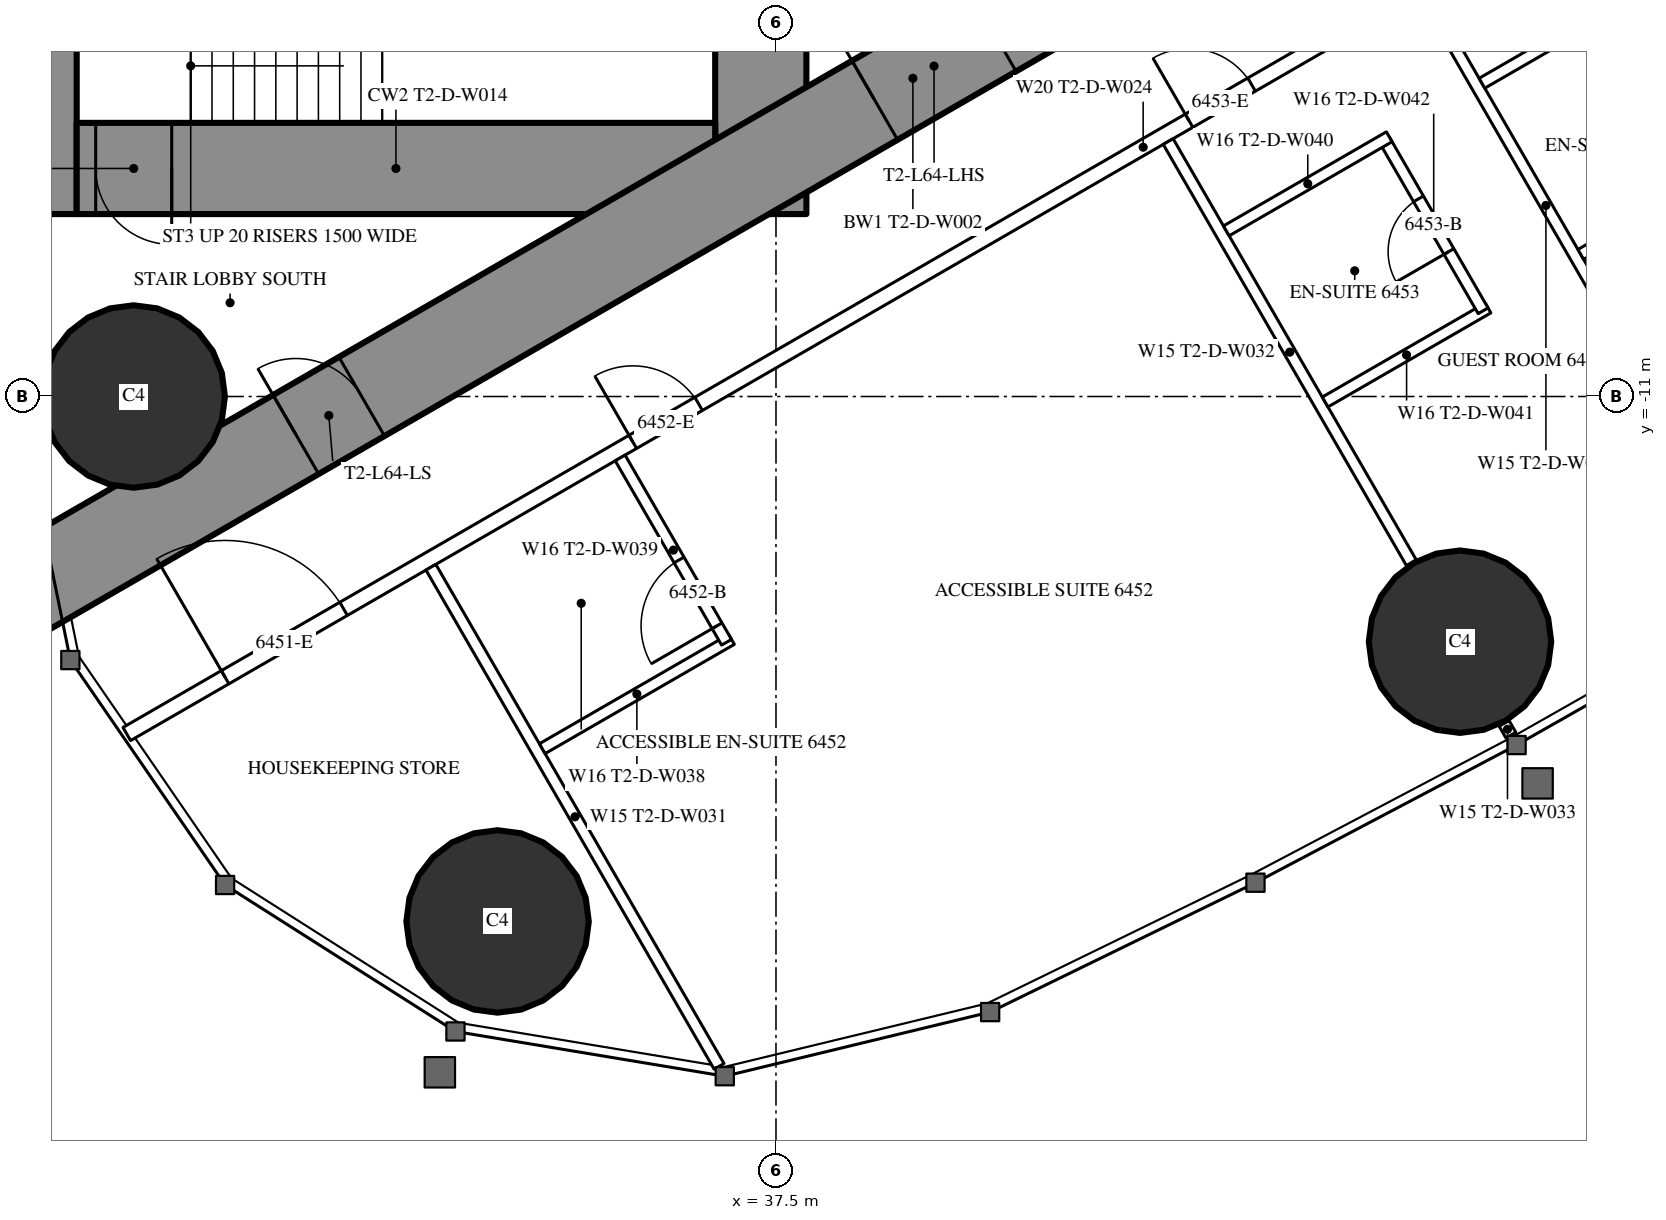
"""IFC4 building model, lengths in metres.
Left out: names, types, materials, properties, quantities, classifications, styles, units other than length and angle.
Written with IfcOpenShell. Run it as: python <this file> out.ifc"""

import sys

from ifc_helpers import new_model, si_unit, direction, frame, frame_2d, origin, origin_2d, place, context, subcontext, project, spatial, rectangle, circle, extrude, element, fill, save


model = new_model("IFC4")
c1 = context("Model", 3, precision=1e-05, world=origin(), true_north=direction((0.0, 1.0)))
c2 = subcontext(c1, "Body", "Model", "MODEL_VIEW")
j1 = project(units=[si_unit("LENGTHUNIT", "METRE"), si_unit("PLANEANGLEUNIT", "RADIAN")], contexts=[c1])
p1 = place(None, origin())
s1 = spatial("IfcSite", under=j1, at=p1, CompositionType="ELEMENT")
p2 = place(p1, origin())
s2 = spatial("IfcBuilding", under=s1, at=p2, CompositionType="ELEMENT")
p3 = place(p2, frame((0.0, 0.0, 240.5)))
s3 = spatial("IfcBuildingStorey", under=s2, at=p3, CompositionType="ELEMENT", Elevation=240.5)
for number, where, z_axis, x_axis in (
    (1, (33.837, -17.906, 0.0), (0.0, 0.0, 1.0), (1.0, 0.0, 0.0)),
    (2, (29.05, -11.0, 0.0), (0.0, 0.0, 1.0), (1.0, 0.0, 0.0)),
    (3, (46.499, -14.226, 0.0), (0.0, 0.0, 1.0), (1.0, 0.0, 0.0)),
):
    element("IfcColumn", number, at=place(p3, frame(where, z_axis=z_axis, x_axis=x_axis)), inside=s3, PredefinedType="COLUMN", context=c2, shape_type="SweptSolid", body=[
        extrude(circle(Radius=1.2, at=origin_2d()), origin(), (0.0, 0.0, 1.0), 3.6),
    ])
p4 = place(p3, frame((27.9, -8.6, 0.0), z_axis=(0.0, 0.0, 1.0), x_axis=(0.0, 1.0, 0.0)))
e4 = element("IfcWall", 4, at=p4, inside=s3, PredefinedType="SHEAR", context=c2, shape_type="SweptSolid", body=[
    extrude(rectangle(XDim=17.2, YDim=0.8, at=frame_2d((8.6, 0.0))), origin(), (0.0, 0.0, 1.0), 3.6),
])
p5 = place(p4, frame((9.35, 0.0, 0.0)))
e5 = element("IfcOpeningElement", 5, at=p5, cuts=e4, PredefinedType="OPENING", context=c2, shape_type="SweptSolid", body=[
    extrude(rectangle(XDim=0.9, YDim=2.2, at=frame_2d((0.45, 1.1))), frame((0.0, 0.41, 0.0), z_axis=(0.0, -1.0, 0.0), x_axis=(1.0, 0.0, 0.0)), (0.0, 0.0, 1.0), 0.82),
])
p6 = place(p3, frame((37.3, -8.6, 0.0), z_axis=(0.0, 0.0, 1.0), x_axis=(0.0, 1.0, 0.0)))
e6 = element("IfcWall", 6, at=p6, inside=s3, PredefinedType="SHEAR", context=c2, shape_type="SweptSolid", body=[
    extrude(rectangle(XDim=17.2, YDim=1.2, at=frame_2d((8.6, 0.0))), origin(), (0.0, 0.0, 1.0), 3.6),
])
p7 = place(p6, frame((7.7, 0.0, 0.0)))
e7 = element("IfcOpeningElement", 7, at=p7, cuts=e6, PredefinedType="OPENING", context=c2, shape_type="SweptSolid", body=[
    extrude(rectangle(XDim=1.8, YDim=2.2, at=frame_2d((0.9, 1.1))), frame((0.0, 0.61, 0.0), z_axis=(0.0, -1.0, 0.0), x_axis=(1.0, 0.0, 0.0)), (0.0, 0.0, 1.0), 1.22),
])
p8 = place(p3, frame((28.3, -8.0, 0.0), z_axis=(0.0, 0.0, 1.0), x_axis=(1.0, 0.0, 0.0)))
e8 = element("IfcWall", 8, at=p8, inside=s3, PredefinedType="SHEAR", context=c2, shape_type="SweptSolid", body=[
    extrude(rectangle(XDim=8.4, YDim=1.2, at=frame_2d((4.2, 0.0))), origin(), (0.0, 0.0, 1.0), 3.6),
])
p9 = place(p8, frame((0.25, 0.0, 0.0)))
e9 = element("IfcOpeningElement", 9, at=p9, cuts=e8, PredefinedType="OPENING", context=c2, shape_type="SweptSolid", body=[
    extrude(rectangle(XDim=1.0, YDim=2.2, at=frame_2d((0.5, 1.1))), frame((0.0, 0.61, 0.0), z_axis=(0.0, -1.0, 0.0), x_axis=(1.0, 0.0, 0.0)), (0.0, 0.0, 1.0), 1.22),
])
p10 = place(p3, frame((27.2, -13.8, 0.0), z_axis=(0.0, 0.0, 1.0), x_axis=(0.866027159892, 0.499996958321, 0.0)))
e10 = element("IfcWall", 10, at=p10, inside=s3, PredefinedType="SHEAR", context=c2, shape_type="SweptSolid", body=[
    extrude(rectangle(XDim=27.947, YDim=1.2, at=frame_2d((13.973, 0.0))), origin(), (0.0, 0.0, 1.0), 3.6),
])
p11 = place(p10, frame((4.6, 0.0, 0.0)))
e11 = element("IfcOpeningElement", 11, at=p11, cuts=e10, PredefinedType="OPENING", context=c2, shape_type="SweptSolid", body=[
    extrude(rectangle(XDim=1.0, YDim=2.2, at=frame_2d((0.5, 1.1))), frame((0.0, 0.61, 0.0), z_axis=(0.0, -1.0, 0.0), x_axis=(1.0, 0.0, 0.0)), (0.0, 0.0, 1.0), 1.22),
])
p12 = place(p10, frame((13.395, 0.0, 0.0)))
e12 = element("IfcOpeningElement", 12, at=p12, cuts=e10, PredefinedType="OPENING", context=c2, shape_type="SweptSolid", body=[
    extrude(rectangle(XDim=1.8, YDim=2.2, at=frame_2d((0.9, 1.1))), frame((0.0, 0.61, 0.0), z_axis=(0.0, -1.0, 0.0), x_axis=(1.0, 0.0, 0.0)), (0.0, 0.0, 1.0), 1.22),
])
p13 = place(p3, frame((28.959, -15.44, 0.0), z_axis=(0.0, 0.0, 1.0), x_axis=(0.866025227435, 0.500000305447, 0.0)))
e13 = element("IfcWall", 13, at=p13, inside=s3, PredefinedType="PARTITIONING", context=c2, shape_type="SweptSolid", body=[
    extrude(rectangle(XDim=30.88, YDim=0.2, at=frame_2d((15.44, 0.0))), origin(), (0.0, 0.0, 1.0), 3.35),
])
p14 = place(p13, frame((1.494, 0.0, 0.0)))
e14 = element("IfcOpeningElement", 14, at=p14, cuts=e13, PredefinedType="OPENING", context=c2, shape_type="SweptSolid", body=[
    extrude(rectangle(XDim=1.8, YDim=2.03, at=frame_2d((0.9, 1.015))), frame((0.0, 0.11, 0.0), z_axis=(0.0, -1.0, 0.0), x_axis=(1.0, 0.0, 0.0)), (0.0, 0.0, 1.0), 0.22),
])
p15 = place(p13, frame((7.687, 0.0, 0.0)))
e15 = element("IfcOpeningElement", 15, at=p15, cuts=e13, PredefinedType="OPENING", context=c2, shape_type="SweptSolid", body=[
    extrude(rectangle(XDim=1.0, YDim=2.2, at=frame_2d((0.5, 1.1))), frame((0.0, 0.11, 0.0), z_axis=(0.0, -1.0, 0.0), x_axis=(1.0, 0.0, 0.0)), (0.0, 0.0, 1.0), 0.22),
])
p16 = place(p13, frame((16.137, 0.0, 0.0)))
e16 = element("IfcOpeningElement", 16, at=p16, cuts=e13, PredefinedType="OPENING", context=c2, shape_type="SweptSolid", body=[
    extrude(rectangle(XDim=0.95, YDim=2.2, at=frame_2d((0.475, 1.1))), frame((0.0, 0.11, 0.0), z_axis=(0.0, -1.0, 0.0), x_axis=(1.0, 0.0, 0.0)), (0.0, 0.0, 1.0), 0.22),
])
p17 = place(p13, frame((20.021, 0.0, 0.0)))
e17 = element("IfcOpeningElement", 17, at=p17, cuts=e13, PredefinedType="OPENING", context=c2, shape_type="SweptSolid", body=[
    extrude(rectangle(XDim=0.95, YDim=2.2, at=frame_2d((0.475, 1.1))), frame((0.0, 0.11, 0.0), z_axis=(0.0, -1.0, 0.0), x_axis=(1.0, 0.0, 0.0)), (0.0, 0.0, 1.0), 0.22),
])
p18 = place(p13, frame((26.253, 0.0, 0.0)))
e18 = element("IfcOpeningElement", 18, at=p18, cuts=e13, PredefinedType="OPENING", context=c2, shape_type="SweptSolid", body=[
    extrude(rectangle(XDim=0.95, YDim=2.2, at=frame_2d((0.475, 1.1))), frame((0.0, 0.11, 0.0), z_axis=(0.0, -1.0, 0.0), x_axis=(1.0, 0.0, 0.0)), (0.0, 0.0, 1.0), 0.22),
])
p19 = place(p3, frame((32.96, -13.246, 0.0), z_axis=(0.0, 0.0, 1.0), x_axis=(0.500000236886, -0.866025267018, 0.0)))
e19 = element("IfcWall", 19, at=p19, inside=s3, PredefinedType="PARTITIONING", context=c2, shape_type="SweptSolid", body=[
    extrude(rectangle(XDim=7.583, YDim=0.15, at=frame_2d((3.791, 0.0))), origin(), (0.0, 0.0, 1.0), 3.35),
])
p20 = place(p3, frame((42.66, -7.646, 0.0), z_axis=(0.0, 0.0, 1.0), x_axis=(0.499996592859, -0.866027370889, 0.0)))
e20 = element("IfcWall", 20, at=p20, inside=s3, PredefinedType="PARTITIONING", context=c2, shape_type="SweptSolid", body=[
    extrude(rectangle(XDim=6.398, YDim=0.15, at=frame_2d((3.199, 0.0))), origin(), (0.0, 0.0, 1.0), 2.45),
])
p21 = place(p3, frame((47.079, -15.3, 0.0), z_axis=(0.0, 0.0, 1.0), x_axis=(0.499212083968, -0.866479829667, 0.0)))
e21 = element("IfcWall", 21, at=p21, inside=s3, PredefinedType="PARTITIONING", context=c2, shape_type="SweptSolid", body=[
    extrude(rectangle(XDim=0.179, YDim=0.15, at=frame_2d((0.09, 0.0))), origin(), (0.0, 0.0, 1.0), 2.45),
])
p22 = place(p3, frame((46.023, -5.704, 0.0), z_axis=(0.0, 0.0, 1.0), x_axis=(0.499984478165, -0.866034365135, 0.0)))
e22 = element("IfcWall", 22, at=p22, inside=s3, PredefinedType="PARTITIONING", context=c2, shape_type="SweptSolid", body=[
    extrude(rectangle(XDim=6.426, YDim=0.15, at=frame_2d((3.213, 0.0))), origin(), (0.0, 0.0, 1.0), 2.45),
])
p23 = place(p3, frame((34.425, -15.633, 0.0), z_axis=(0.0, 0.0, 1.0), x_axis=(0.866018712932, 0.500011588718, 0.0)))
e23 = element("IfcWall", 23, at=p23, inside=s3, PredefinedType="PARTITIONING", context=c2, shape_type="SweptSolid", body=[
    extrude(rectangle(XDim=2.875, YDim=0.15, at=frame_2d((1.438, 0.0))), origin(), (0.0, 0.0, 1.0), 3.35),
])
p24 = place(p3, frame((35.45, -11.808, 0.0), z_axis=(0.0, 0.0, 1.0), x_axis=(0.49994636267, -0.866056369097, 0.0)))
e24 = element("IfcWall", 24, at=p24, inside=s3, PredefinedType="PARTITIONING", context=c2, shape_type="SweptSolid", body=[
    extrude(rectangle(XDim=2.8, YDim=0.15, at=frame_2d((1.4, 0.0))), origin(), (0.0, 0.0, 1.0), 3.35),
])
p25 = place(p24, frame((1.55, 0.0, 0.0)))
e25 = element("IfcOpeningElement", 25, at=p25, cuts=e24, PredefinedType="OPENING", context=c2, shape_type="SweptSolid", body=[
    extrude(rectangle(XDim=1.0, YDim=2.2, at=frame_2d((0.5, 1.1))), frame((0.0, 0.085, 0.0), z_axis=(0.0, -1.0, 0.0), x_axis=(1.0, 0.0, 0.0)), (0.0, 0.0, 1.0), 0.17),
])
p26 = place(p3, frame((44.725, -11.072, 0.0), z_axis=(0.0, 0.0, 1.0), x_axis=(0.866006523861, 0.500032699561, 0.0)))
e26 = element("IfcWall", 26, at=p26, inside=s3, PredefinedType="PARTITIONING", context=c2, shape_type="SweptSolid", body=[
    extrude(rectangle(XDim=2.475, YDim=0.15, at=frame_2d((1.237, 0.0))), origin(), (0.0, 0.0, 1.0), 3.35),
])
p27 = place(p3, frame((45.503, -7.621, 0.0), z_axis=(0.0, 0.0, 1.0), x_axis=(0.500006934395, -0.866021400173, 0.0)))
e27 = element("IfcWall", 27, at=p27, inside=s3, PredefinedType="PARTITIONING", context=c2, shape_type="SweptSolid", body=[
    extrude(rectangle(XDim=2.6, YDim=0.15, at=frame_2d((1.3, 0.0))), origin(), (0.0, 0.0, 1.0), 3.35),
])
p28 = place(p27, frame((0.9, 0.0, 0.0)))
e28 = element("IfcOpeningElement", 28, at=p28, cuts=e27, PredefinedType="OPENING", context=c2, shape_type="SweptSolid", body=[
    extrude(rectangle(XDim=0.8, YDim=2.2, at=frame_2d((0.4, 1.1))), frame((0.0, 0.085, 0.0), z_axis=(0.0, -1.0, 0.0), x_axis=(1.0, 0.0, 0.0)), (0.0, 0.0, 1.0), 0.17),
])
for number, where, z_axis, x_axis in (
    (29, (43.425, -8.821, 0.0), (0.0, 0.0, 1.0), (0.866, 0.5, 0.0)),
    (30, (48.088, -9.13, 0.0), (0.0, 0.0, 1.0), (0.866, 0.5, 0.0)),
    (31, (46.788, -6.879, 0.0), (0.0, 0.0, 1.0), (0.866, 0.5, 0.0)),
):
    element("IfcWall", number, at=place(p3, frame(where, z_axis=z_axis, x_axis=x_axis)), inside=s3, PredefinedType="PARTITIONING", context=c2, shape_type="SweptSolid", body=[
        extrude(rectangle(XDim=2.475, YDim=0.15, at=frame_2d((1.237, 0.0))), origin(), (0.0, 0.0, 1.0), 3.35),
    ])
p29 = place(p14, origin())
e32 = element("IfcDoor", 32, at=p29, inside=s3, OperationType="DOUBLE_DOOR_SINGLE_SWING", PredefinedType="DOOR", context=c2, shape_type="SweptSolid", body=[
    extrude(rectangle(XDim=1.8, YDim=2.03, at=frame_2d((0.9, 1.015))), frame((0.0, 0.025, 0.0), z_axis=(0.0, -1.0, 0.0), x_axis=(1.0, 0.0, 0.0)), (0.0, 0.0, 1.0), 0.05),
])
fill(e14, e32)
p30 = place(p25, origin())
e33 = element("IfcDoor", 33, at=p30, inside=s3, OperationType="SINGLE_SWING_RIGHT", PredefinedType="DOOR", context=c2, shape_type="SweptSolid", body=[
    extrude(rectangle(XDim=1.0, YDim=2.2, at=frame_2d((0.5, 1.1))), frame((0.0, 0.025, 0.0), z_axis=(0.0, -1.0, 0.0), x_axis=(1.0, 0.0, 0.0)), (0.0, 0.0, 1.0), 0.05),
])
fill(e25, e33)
p31 = place(p15, origin())
e34 = element("IfcDoor", 34, at=p31, inside=s3, OperationType="SINGLE_SWING_LEFT", PredefinedType="DOOR", context=c2, shape_type="SweptSolid", body=[
    extrude(rectangle(XDim=1.0, YDim=2.2, at=frame_2d((0.5, 1.1))), frame((0.0, 0.025, 0.0), z_axis=(0.0, -1.0, 0.0), x_axis=(1.0, 0.0, 0.0)), (0.0, 0.0, 1.0), 0.05),
])
fill(e15, e34)
p32 = place(p28, origin())
e35 = element("IfcDoor", 35, at=p32, inside=s3, OperationType="SINGLE_SWING_RIGHT", PredefinedType="DOOR", context=c2, shape_type="SweptSolid", body=[
    extrude(rectangle(XDim=0.8, YDim=2.2, at=frame_2d((0.4, 1.1))), frame((0.0, 0.025, 0.0), z_axis=(0.0, -1.0, 0.0), x_axis=(1.0, 0.0, 0.0)), (0.0, 0.0, 1.0), 0.05),
])
fill(e28, e35)
p33 = place(p16, origin())
e36 = element("IfcDoor", 36, at=p33, inside=s3, OperationType="SINGLE_SWING_LEFT", PredefinedType="DOOR", context=c2, shape_type="SweptSolid", body=[
    extrude(rectangle(XDim=0.95, YDim=2.2, at=frame_2d((0.475, 1.1))), frame((0.0, 0.025, 0.0), z_axis=(0.0, -1.0, 0.0), x_axis=(1.0, 0.0, 0.0)), (0.0, 0.0, 1.0), 0.05),
])
fill(e16, e36)
p34 = place(p11, origin())
e37 = element("IfcDoor", 37, at=p34, inside=s3, OperationType="SINGLE_SWING_LEFT", PredefinedType="DOOR", context=c2, shape_type="SweptSolid", body=[
    extrude(rectangle(XDim=1.0, YDim=2.2, at=frame_2d((0.5, 1.1))), frame((0.0, 0.025, 0.0), z_axis=(0.0, -1.0, 0.0), x_axis=(1.0, 0.0, 0.0)), (0.0, 0.0, 1.0), 0.05),
])
fill(e11, e37)
p35 = place(p12, origin())
e38 = element("IfcDoor", 38, at=p35, inside=s3, OperationType="DOUBLE_DOOR_SINGLE_SWING", PredefinedType="DOOR", context=c2, shape_type="SweptSolid", body=[
    extrude(rectangle(XDim=1.8, YDim=2.2, at=frame_2d((0.9, 1.1))), frame((0.0, 0.025, 0.0), z_axis=(0.0, -1.0, 0.0), x_axis=(1.0, 0.0, 0.0)), (0.0, 0.0, 1.0), 0.05),
])
fill(e12, e38)
p36 = place(p9, origin())
e39 = element("IfcDoor", 39, at=p36, inside=s3, OperationType="SINGLE_SWING_RIGHT", PredefinedType="DOOR", context=c2, shape_type="SweptSolid", body=[
    extrude(rectangle(XDim=1.0, YDim=2.2, at=frame_2d((0.5, 1.1))), frame((0.0, 0.025, 0.0), z_axis=(0.0, -1.0, 0.0), x_axis=(1.0, 0.0, 0.0)), (0.0, 0.0, 1.0), 0.05),
])
fill(e9, e39)
save(model, sys.argv[1])
